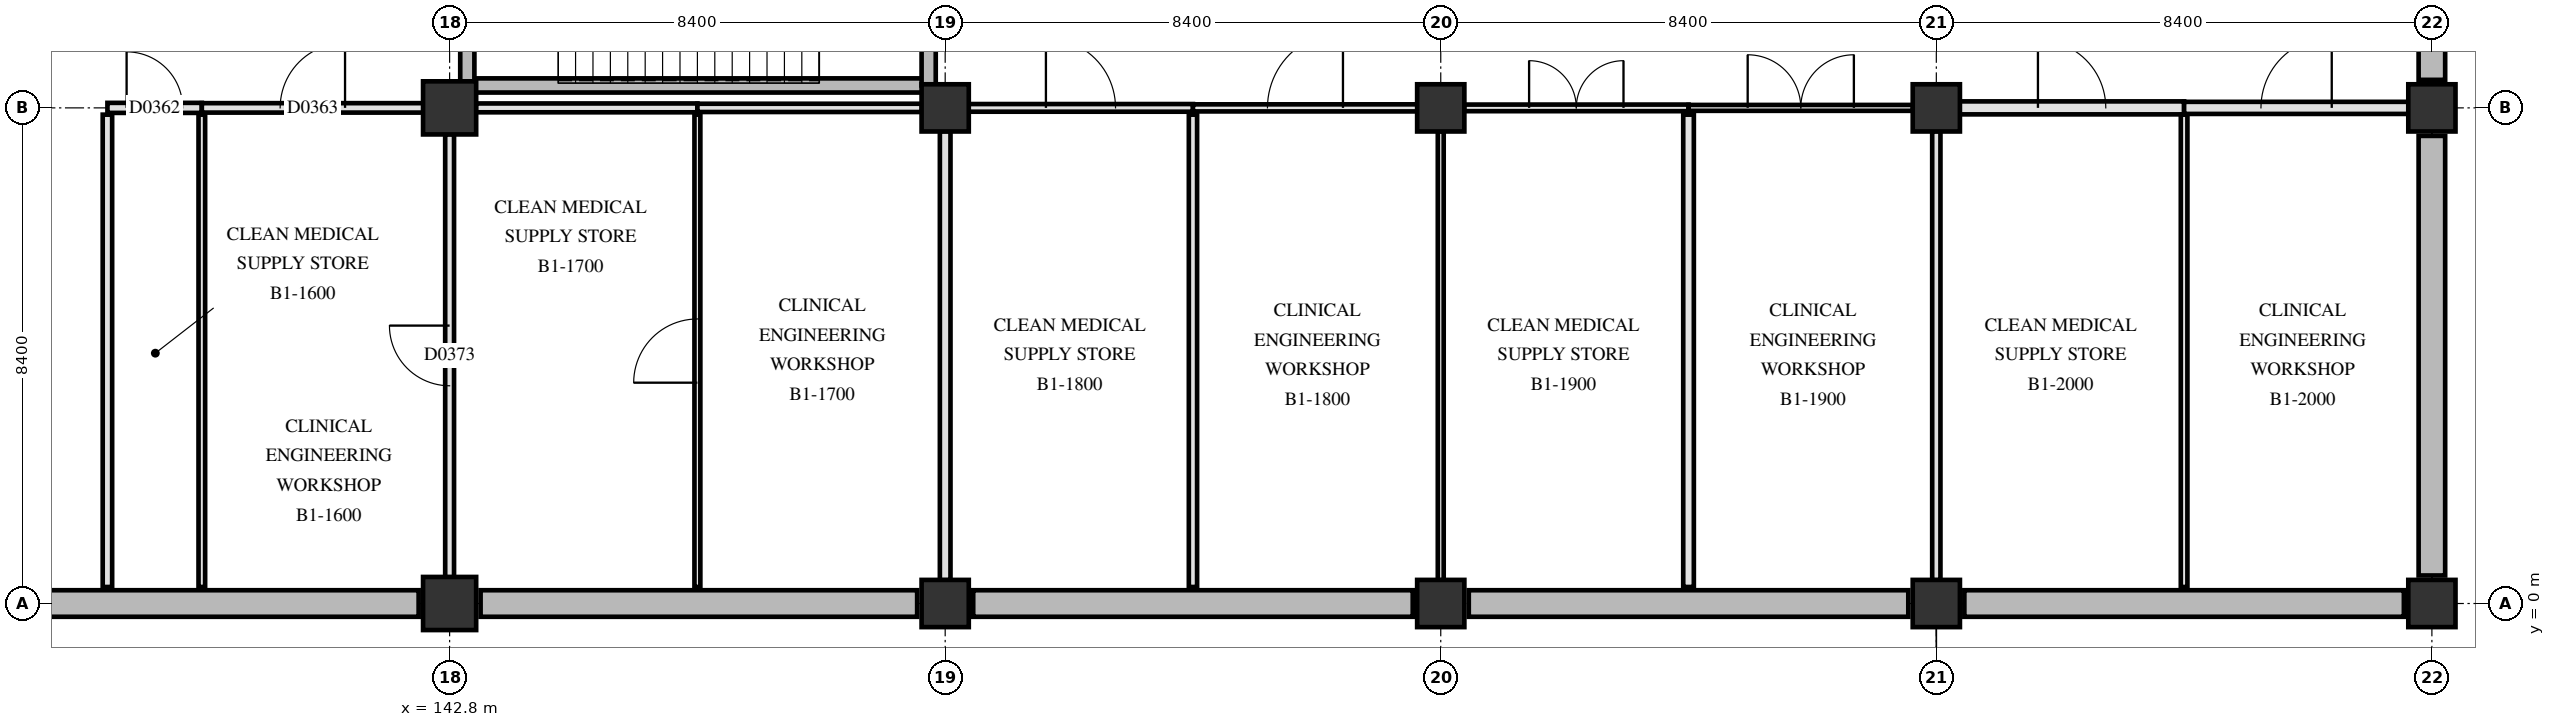
"""IFC4 building model, lengths in metres.
Left out: names, types, materials, properties, quantities, classifications, styles, units other than length and angle.
Written with IfcOpenShell. Run it as: python <this file> out.ifc"""

import sys

from ifc_helpers import new_model, si_unit, direction, frame, frame_2d, origin, origin_2d, place, context, subcontext, project, spatial, rectangle, extrude, element, fill, save


model = new_model("IFC4")
c1 = context("Model", 3, precision=1e-05, world=origin(), true_north=direction((0.0, 1.0)))
c2 = subcontext(c1, "Body", "Model", "MODEL_VIEW")
j1 = project(units=[si_unit("LENGTHUNIT", "METRE"), si_unit("PLANEANGLEUNIT", "RADIAN")], contexts=[c1])
p1 = place(None, origin())
s1 = spatial("IfcSite", under=j1, at=p1, CompositionType="ELEMENT")
p2 = place(p1, origin())
s2 = spatial("IfcBuilding", under=s1, at=p2, CompositionType="ELEMENT")
p3 = place(p2, frame((0.0, 0.0, -5.4)))
s3 = spatial("IfcBuildingStorey", under=s2, at=p3, CompositionType="ELEMENT", Elevation=-5.4)
for number, where, z_axis, x_axis in (
    (1, (142.8, 0.0, 0.0), (0.0, 0.0, 1.0), (1.0, 0.0, 0.0)),
    (2, (142.8, 8.4, 0.0), (0.0, 0.0, 1.0), (1.0, 0.0, 0.0)),
):
    element("IfcColumn", number, at=place(p3, frame(where, z_axis=z_axis, x_axis=x_axis)), inside=s3, PredefinedType="COLUMN", context=c2, shape_type="SweptSolid", body=[
        extrude(rectangle(XDim=0.9, YDim=0.9, at=origin_2d()), origin(), (0.0, 0.0, 1.0), 5.4),
    ])
for number, where, z_axis, x_axis in (
    (3, (151.2, 0.0, 0.0), (0.0, 0.0, 1.0), (1.0, 0.0, 0.0)),
    (4, (151.2, 8.4, 0.0), (0.0, 0.0, 1.0), (1.0, 0.0, 0.0)),
    (5, (159.6, 0.0, 0.0), (0.0, 0.0, 1.0), (1.0, 0.0, 0.0)),
    (6, (159.6, 8.4, 0.0), (0.0, 0.0, 1.0), (1.0, 0.0, 0.0)),
    (7, (168.0, 0.0, 0.0), (0.0, 0.0, 1.0), (1.0, 0.0, 0.0)),
    (8, (168.0, 8.4, 0.0), (0.0, 0.0, 1.0), (1.0, 0.0, 0.0)),
    (9, (176.4, 0.0, 0.0), (0.0, 0.0, 1.0), (1.0, 0.0, 0.0)),
    (10, (176.4, 8.4, 0.0), (0.0, 0.0, 1.0), (1.0, 0.0, 0.0)),
):
    element("IfcColumn", number, at=place(p3, frame(where, z_axis=z_axis, x_axis=x_axis)), inside=s3, PredefinedType="COLUMN", context=c2, shape_type="SweptSolid", body=[
        extrude(rectangle(XDim=0.8, YDim=0.8, at=origin_2d()), origin(), (0.0, 0.0, 1.0), 5.4),
    ])
for number, where, z_axis, x_axis in (
    (11, (176.4, 16.325, 0.0), (0.0, 0.0, 1.0), (0.0, -1.0, 0.0)),
    (12, (176.4, 7.925, 0.0), (0.0, 0.0, 1.0), (0.0, -1.0, 0.0)),
    (13, (175.925, 0.0, 0.0), (0.0, 0.0, 1.0), (-1.0, 0.0, 0.0)),
    (14, (167.525, 0.0, 0.0), (0.0, 0.0, 1.0), (-1.0, 0.0, 0.0)),
    (15, (159.125, 0.0, 0.0), (0.0, 0.0, 1.0), (-1.0, 0.0, 0.0)),
):
    element("IfcWall", number, at=place(p3, frame(where, z_axis=z_axis, x_axis=x_axis)), inside=s3, PredefinedType="SOLIDWALL", context=c2, shape_type="SweptSolid", body=[
        extrude(rectangle(XDim=7.45, YDim=0.45, at=frame_2d((3.725, 0.0))), origin(), (0.0, 0.0, 1.0), 5.08),
    ])
p4 = place(p3, frame((150.725, 0.0, 0.0), z_axis=(0.0, 0.0, 1.0), x_axis=(-1.0, 0.0, 0.0)))
e16 = element("IfcWall", 16, at=p4, inside=s3, PredefinedType="SOLIDWALL", context=c2, shape_type="SweptSolid", body=[
    extrude(rectangle(XDim=7.4, YDim=0.45, at=frame_2d((3.7, 0.0))), origin(), (0.0, 0.0, 1.0), 5.08),
])
p5 = place(p3, frame((142.275, 0.0, 0.0), z_axis=(0.0, 0.0, 1.0), x_axis=(-1.0, 0.0, 0.0)))
e17 = element("IfcWall", 17, at=p5, inside=s3, PredefinedType="SOLIDWALL", context=c2, shape_type="SweptSolid", body=[
    extrude(rectangle(XDim=7.35, YDim=0.45, at=frame_2d((3.675, 0.0))), origin(), (0.0, 0.0, 1.0), 5.08),
])
p6 = place(p3, frame((143.1, 8.78, 0.0), z_axis=(0.0, 0.0, 1.0), x_axis=(1.0, 0.0, 0.0)))
e18 = element("IfcWall", 18, at=p6, inside=s3, PredefinedType="SHEAR", context=c2, shape_type="SweptSolid", body=[
    extrude(rectangle(XDim=7.82, YDim=0.24, at=frame_2d((3.91, 0.0))), origin(), (0.0, 0.0, 1.0), 5.08),
])
for number, where, z_axis, x_axis in (
    (19, (143.1, 8.78, 0.0), (0.0, 0.0, 1.0), (0.0, 1.0, 0.0)),
    (20, (150.92, 8.78, 0.0), (0.0, 0.0, 1.0), (0.0, 1.0, 0.0)),
):
    element("IfcWall", number, at=place(p3, frame(where, z_axis=z_axis, x_axis=x_axis)), inside=s3, PredefinedType="SHEAR", context=c2, shape_type="SweptSolid", body=[
        extrude(rectangle(XDim=3.32, YDim=0.24, at=frame_2d((1.66, 0.0))), origin(), (0.0, 0.0, 1.0), 5.08),
    ])
p7 = place(p3, frame((137.0, 8.4, 0.0), z_axis=(0.0, 0.0, 1.0), x_axis=(1.0, 0.0, 0.0)))
e21 = element("IfcWall", 21, at=p7, inside=s3, PredefinedType="PARTITIONING", context=c2, shape_type="SweptSolid", body=[
    extrude(rectangle(XDim=1.6, YDim=0.17, at=frame_2d((0.8, 0.0))), origin(), (0.0, 0.0, 1.0), 4.42),
])
p8 = place(p7, frame((0.325, 0.0, 0.0)))
e22 = element("IfcOpeningElement", 22, at=p8, cuts=e21, PredefinedType="OPENING", context=c2, shape_type="SweptSolid", body=[
    extrude(rectangle(XDim=0.95, YDim=2.1, at=frame_2d((0.475, 1.05))), frame((0.0, 0.095, 0.0), z_axis=(0.0, -1.0, 0.0), x_axis=(1.0, 0.0, 0.0)), (0.0, 0.0, 1.0), 0.19),
])
p9 = place(p3, frame((138.6, 8.4, 0.0), z_axis=(0.0, 0.0, 1.0), x_axis=(1.0, 0.0, 0.0)))
e23 = element("IfcWall", 23, at=p9, inside=s3, PredefinedType="PARTITIONING", context=c2, shape_type="SweptSolid", body=[
    extrude(rectangle(XDim=3.755, YDim=0.16, at=frame_2d((1.877, 0.0))), origin(), (0.0, 0.0, 1.0), 4.42),
])
p10 = place(p9, frame((1.327, 0.0, 0.0)))
e24 = element("IfcOpeningElement", 24, at=p10, cuts=e23, PredefinedType="OPENING", context=c2, shape_type="SweptSolid", body=[
    extrude(rectangle(XDim=1.1, YDim=2.15, at=frame_2d((0.55, 1.075))), frame((0.0, 0.09, 0.0), z_axis=(0.0, -1.0, 0.0), x_axis=(1.0, 0.0, 0.0)), (0.0, 0.0, 1.0), 0.18),
])
p11 = place(p3, frame((143.245, 8.4, 0.0), z_axis=(0.0, 0.0, 1.0), x_axis=(1.0, 0.0, 0.0)))
e25 = element("IfcWall", 25, at=p11, inside=s3, PredefinedType="PARTITIONING", context=c2, shape_type="SweptSolid", body=[
    extrude(rectangle(XDim=3.755, YDim=0.15, at=frame_2d((1.877, 0.0))), origin(), (0.0, 0.0, 1.0), 4.42),
])
p12 = place(p3, frame((147.0, 8.4, 0.0), z_axis=(0.0, 0.0, 1.0), x_axis=(1.0, 0.0, 0.0)))
e26 = element("IfcWall", 26, at=p12, inside=s3, PredefinedType="PARTITIONING", context=c2, shape_type="SweptSolid", body=[
    extrude(rectangle(XDim=3.805, YDim=0.14, at=frame_2d((1.902, 0.0))), origin(), (0.0, 0.0, 1.0), 4.42),
])
p13 = place(p3, frame((151.595, 8.4, 0.0), z_axis=(0.0, 0.0, 1.0), x_axis=(1.0, 0.0, 0.0)))
e27 = element("IfcWall", 27, at=p13, inside=s3, PredefinedType="PARTITIONING", context=c2, shape_type="SweptSolid", body=[
    extrude(rectangle(XDim=3.805, YDim=0.13, at=frame_2d((1.902, 0.0))), origin(), (0.0, 0.0, 1.0), 4.42),
])
p14 = place(p13, frame((1.312, 0.0, 0.0)))
e28 = element("IfcOpeningElement", 28, at=p14, cuts=e27, PredefinedType="OPENING", context=c2, shape_type="SweptSolid", body=[
    extrude(rectangle(XDim=1.18, YDim=2.18, at=frame_2d((0.59, 1.09))), frame((0.0, 0.075, 0.0), z_axis=(0.0, -1.0, 0.0), x_axis=(1.0, 0.0, 0.0)), (0.0, 0.0, 1.0), 0.15),
])
p15 = place(p3, frame((155.4, 8.4, 0.0), z_axis=(0.0, 0.0, 1.0), x_axis=(1.0, 0.0, 0.0)))
e29 = element("IfcWall", 29, at=p15, inside=s3, PredefinedType="PARTITIONING", context=c2, shape_type="SweptSolid", body=[
    extrude(rectangle(XDim=3.805, YDim=0.12, at=frame_2d((1.903, 0.0))), origin(), (0.0, 0.0, 1.0), 4.42),
])
p16 = place(p15, frame((1.262, 0.0, 0.0)))
e30 = element("IfcOpeningElement", 30, at=p16, cuts=e29, PredefinedType="OPENING", context=c2, shape_type="SweptSolid", body=[
    extrude(rectangle(XDim=1.28, YDim=2.18, at=frame_2d((0.64, 1.09))), frame((0.0, 0.07, 0.0), z_axis=(0.0, -1.0, 0.0), x_axis=(1.0, 0.0, 0.0)), (0.0, 0.0, 1.0), 0.14),
])
p17 = place(p3, frame((159.995, 8.4, 0.0), z_axis=(0.0, 0.0, 1.0), x_axis=(1.0, 0.0, 0.0)))
e31 = element("IfcWall", 31, at=p17, inside=s3, PredefinedType="PARTITIONING", context=c2, shape_type="SweptSolid", body=[
    extrude(rectangle(XDim=3.805, YDim=0.112, at=frame_2d((1.902, 0.0))), origin(), (0.0, 0.0, 1.0), 4.42),
])
p18 = place(p17, frame((1.103, 0.0, 0.0)))
e32 = element("IfcOpeningElement", 32, at=p18, cuts=e31, PredefinedType="OPENING", context=c2, shape_type="SweptSolid", body=[
    extrude(rectangle(XDim=1.6, YDim=2.25, at=frame_2d((0.8, 1.125))), frame((0.0, 0.066, 0.0), z_axis=(0.0, -1.0, 0.0), x_axis=(1.0, 0.0, 0.0)), (0.0, 0.0, 1.0), 0.132),
])
p19 = place(p3, frame((163.8, 8.4, 0.0), z_axis=(0.0, 0.0, 1.0), x_axis=(1.0, 0.0, 0.0)))
e33 = element("IfcWall", 33, at=p19, inside=s3, PredefinedType="PARTITIONING", context=c2, shape_type="SweptSolid", body=[
    extrude(rectangle(XDim=3.805, YDim=0.1, at=frame_2d((1.902, 0.0))), origin(), (0.0, 0.0, 1.0), 4.42),
])
p20 = place(p19, frame((1.002, 0.0, 0.0)))
e34 = element("IfcOpeningElement", 34, at=p20, cuts=e33, PredefinedType="OPENING", context=c2, shape_type="SweptSolid", body=[
    extrude(rectangle(XDim=1.8, YDim=2.25, at=frame_2d((0.9, 1.125))), frame((0.0, 0.06, 0.0), z_axis=(0.0, -1.0, 0.0), x_axis=(1.0, 0.0, 0.0)), (0.0, 0.0, 1.0), 0.12),
])
p21 = place(p3, frame((168.395, 8.4, 0.0), z_axis=(0.0, 0.0, 1.0), x_axis=(1.0, 0.0, 0.0)))
e35 = element("IfcWall", 35, at=p21, inside=s3, PredefinedType="PARTITIONING", context=c2, shape_type="SweptSolid", body=[
    extrude(rectangle(XDim=3.805, YDim=0.22, at=frame_2d((1.902, 0.0))), origin(), (0.0, 0.0, 1.0), 4.42),
])
p22 = place(p21, frame((1.327, 0.0, 0.0)))
e36 = element("IfcOpeningElement", 36, at=p22, cuts=e35, PredefinedType="OPENING", context=c2, shape_type="SweptSolid", body=[
    extrude(rectangle(XDim=1.15, YDim=2.15, at=frame_2d((0.575, 1.075))), frame((0.0, 0.12, 0.0), z_axis=(0.0, -1.0, 0.0), x_axis=(1.0, 0.0, 0.0)), (0.0, 0.0, 1.0), 0.24),
])
p23 = place(p3, frame((172.2, 8.4, 0.0), z_axis=(0.0, 0.0, 1.0), x_axis=(1.0, 0.0, 0.0)))
e37 = element("IfcWall", 37, at=p23, inside=s3, PredefinedType="PARTITIONING", context=c2, shape_type="SweptSolid", body=[
    extrude(rectangle(XDim=3.805, YDim=0.205, at=frame_2d((1.902, 0.0))), origin(), (0.0, 0.0, 1.0), 4.42),
])
p24 = place(p23, frame((1.302, 0.0, 0.0)))
e38 = element("IfcOpeningElement", 38, at=p24, cuts=e37, PredefinedType="OPENING", context=c2, shape_type="SweptSolid", body=[
    extrude(rectangle(XDim=1.2, YDim=2.15, at=frame_2d((0.6, 1.075))), frame((0.0, 0.113, 0.0), z_axis=(0.0, -1.0, 0.0), x_axis=(1.0, 0.0, 0.0)), (0.0, 0.0, 1.0), 0.225),
])
p25 = place(p3, frame((137.0, 0.28, 0.0), z_axis=(0.0, 0.0, 1.0), x_axis=(0.0, 1.0, 0.0)))
e39 = element("IfcWall", 39, at=p25, inside=s3, PredefinedType="PARTITIONING", context=c2, shape_type="SweptSolid", body=[
    extrude(rectangle(XDim=8.005, YDim=0.16, at=frame_2d((4.002, 0.0))), origin(), (0.0, 0.0, 1.0), 4.42),
])
p26 = place(p3, frame((138.6, 0.28, 0.0), z_axis=(0.0, 0.0, 1.0), x_axis=(0.0, 1.0, 0.0)))
e40 = element("IfcWall", 40, at=p26, inside=s3, PredefinedType="PARTITIONING", context=c2, shape_type="SweptSolid", body=[
    extrude(rectangle(XDim=8.005, YDim=0.112, at=frame_2d((4.002, 0.0))), origin(), (0.0, 0.0, 1.0), 4.42),
])
p27 = place(p3, frame((142.8, 0.445, 0.0), z_axis=(0.0, 0.0, 1.0), x_axis=(0.0, 1.0, 0.0)))
e41 = element("IfcWall", 41, at=p27, inside=s3, PredefinedType="PARTITIONING", context=c2, shape_type="SweptSolid", body=[
    extrude(rectangle(XDim=7.51, YDim=0.15, at=frame_2d((3.755, 0.0))), origin(), (0.0, 0.0, 1.0), 4.47),
])
p28 = place(p27, frame((3.245, 0.0, 0.0)))
e42 = element("IfcOpeningElement", 42, at=p28, cuts=e41, PredefinedType="OPENING", context=c2, shape_type="SweptSolid", body=[
    extrude(rectangle(XDim=1.02, YDim=2.12, at=frame_2d((0.51, 1.06))), frame((0.0, 0.085, 0.0), z_axis=(0.0, -1.0, 0.0), x_axis=(1.0, 0.0, 0.0)), (0.0, 0.0, 1.0), 0.17),
])
p29 = place(p3, frame((147.0, 0.28, 0.0), z_axis=(0.0, 0.0, 1.0), x_axis=(0.0, 1.0, 0.0)))
e43 = element("IfcWall", 43, at=p29, inside=s3, PredefinedType="PARTITIONING", context=c2, shape_type="SweptSolid", body=[
    extrude(rectangle(XDim=8.005, YDim=0.1, at=frame_2d((4.002, 0.0))), origin(), (0.0, 0.0, 1.0), 4.42),
])
p30 = place(p29, frame((3.462, 0.0, 0.0)))
e44 = element("IfcOpeningElement", 44, at=p30, cuts=e43, PredefinedType="OPENING", context=c2, shape_type="SweptSolid", body=[
    extrude(rectangle(XDim=1.08, YDim=2.12, at=frame_2d((0.54, 1.06))), frame((0.0, 0.06, 0.0), z_axis=(0.0, -1.0, 0.0), x_axis=(1.0, 0.0, 0.0)), (0.0, 0.0, 1.0), 0.12),
])
p31 = place(p3, frame((151.2, 0.395, 0.0), z_axis=(0.0, 0.0, 1.0), x_axis=(0.0, 1.0, 0.0)))
e45 = element("IfcWall", 45, at=p31, inside=s3, PredefinedType="PARTITIONING", context=c2, shape_type="SweptSolid", body=[
    extrude(rectangle(XDim=7.61, YDim=0.18, at=frame_2d((3.805, 0.0))), origin(), (0.0, 0.0, 1.0), 4.47),
])
p32 = place(p3, frame((155.4, 0.28, 0.0), z_axis=(0.0, 0.0, 1.0), x_axis=(0.0, 1.0, 0.0)))
e46 = element("IfcWall", 46, at=p32, inside=s3, PredefinedType="PARTITIONING", context=c2, shape_type="SweptSolid", body=[
    extrude(rectangle(XDim=8.005, YDim=0.14, at=frame_2d((4.002, 0.0))), origin(), (0.0, 0.0, 1.0), 4.42),
])
p33 = place(p3, frame((159.6, 0.395, 0.0), z_axis=(0.0, 0.0, 1.0), x_axis=(0.0, 1.0, 0.0)))
e47 = element("IfcWall", 47, at=p33, inside=s3, PredefinedType="PARTITIONING", context=c2, shape_type="SweptSolid", body=[
    extrude(rectangle(XDim=7.61, YDim=0.1, at=frame_2d((3.805, 0.0))), origin(), (0.0, 0.0, 1.0), 4.47),
])
p34 = place(p3, frame((163.8, 0.28, 0.0), z_axis=(0.0, 0.0, 1.0), x_axis=(0.0, 1.0, 0.0)))
e48 = element("IfcWall", 48, at=p34, inside=s3, PredefinedType="PARTITIONING", context=c2, shape_type="SweptSolid", body=[
    extrude(rectangle(XDim=8.005, YDim=0.18, at=frame_2d((4.002, 0.0))), origin(), (0.0, 0.0, 1.0), 4.42),
])
p35 = place(p3, frame((168.0, 0.395, 0.0), z_axis=(0.0, 0.0, 1.0), x_axis=(0.0, 1.0, 0.0)))
e49 = element("IfcWall", 49, at=p35, inside=s3, PredefinedType="PARTITIONING", context=c2, shape_type="SweptSolid", body=[
    extrude(rectangle(XDim=7.61, YDim=0.14, at=frame_2d((3.805, 0.0))), origin(), (0.0, 0.0, 1.0), 4.47),
])
p36 = place(p3, frame((172.2, 0.28, 0.0), z_axis=(0.0, 0.0, 1.0), x_axis=(0.0, 1.0, 0.0)))
e50 = element("IfcWall", 50, at=p36, inside=s3, PredefinedType="PARTITIONING", context=c2, shape_type="SweptSolid", body=[
    extrude(rectangle(XDim=8.005, YDim=0.112, at=frame_2d((4.002, 0.0))), origin(), (0.0, 0.0, 1.0), 4.42),
])
p37 = place(p8, origin())
e51 = element("IfcDoor", 51, at=p37, inside=s3, OperationType="SINGLE_SWING_LEFT", PredefinedType="DOOR", context=c2, shape_type="SweptSolid", body=[
    extrude(rectangle(XDim=0.95, YDim=2.1, at=frame_2d((0.475, 1.05))), frame((0.0, 0.025, 0.0), z_axis=(0.0, -1.0, 0.0), x_axis=(1.0, 0.0, 0.0)), (0.0, 0.0, 1.0), 0.05),
])
fill(e22, e51)
p38 = place(p10, origin())
e52 = element("IfcDoor", 52, at=p38, inside=s3, OperationType="SINGLE_SWING_RIGHT", PredefinedType="DOOR", context=c2, shape_type="SweptSolid", body=[
    extrude(rectangle(XDim=1.1, YDim=2.15, at=frame_2d((0.55, 1.075))), frame((0.0, 0.025, 0.0), z_axis=(0.0, -1.0, 0.0), x_axis=(1.0, 0.0, 0.0)), (0.0, 0.0, 1.0), 0.05),
])
fill(e24, e52)
p39 = place(p28, origin())
e53 = element("IfcDoor", 53, at=p39, inside=s3, OperationType="SINGLE_SWING_RIGHT", PredefinedType="DOOR", context=c2, shape_type="SweptSolid", body=[
    extrude(rectangle(XDim=1.02, YDim=2.12, at=frame_2d((0.51, 1.06))), frame((0.0, 0.025, 0.0), z_axis=(0.0, -1.0, 0.0), x_axis=(1.0, 0.0, 0.0)), (0.0, 0.0, 1.0), 0.05),
])
fill(e42, e53)
p40 = place(p30, origin())
e54 = element("IfcDoor", 54, at=p40, inside=s3, OperationType="SINGLE_SWING_LEFT", PredefinedType="DOOR", context=c2, shape_type="SweptSolid", body=[
    extrude(rectangle(XDim=1.08, YDim=2.12, at=frame_2d((0.54, 1.06))), frame((0.0, 0.025, 0.0), z_axis=(0.0, -1.0, 0.0), x_axis=(1.0, 0.0, 0.0)), (0.0, 0.0, 1.0), 0.05),
])
fill(e44, e54)
p41 = place(p14, origin())
e55 = element("IfcDoor", 55, at=p41, inside=s3, OperationType="SINGLE_SWING_LEFT", PredefinedType="DOOR", context=c2, shape_type="SweptSolid", body=[
    extrude(rectangle(XDim=1.18, YDim=2.18, at=frame_2d((0.59, 1.09))), frame((0.0, 0.025, 0.0), z_axis=(0.0, -1.0, 0.0), x_axis=(1.0, 0.0, 0.0)), (0.0, 0.0, 1.0), 0.05),
])
fill(e28, e55)
p42 = place(p16, origin())
e56 = element("IfcDoor", 56, at=p42, inside=s3, OperationType="SINGLE_SWING_RIGHT", PredefinedType="DOOR", context=c2, shape_type="SweptSolid", body=[
    extrude(rectangle(XDim=1.28, YDim=2.18, at=frame_2d((0.64, 1.09))), frame((0.0, 0.025, 0.0), z_axis=(0.0, -1.0, 0.0), x_axis=(1.0, 0.0, 0.0)), (0.0, 0.0, 1.0), 0.05),
])
fill(e30, e56)
p43 = place(p18, origin())
e57 = element("IfcDoor", 57, at=p43, inside=s3, OperationType="DOUBLE_SWING_LEFT", PredefinedType="DOOR", context=c2, shape_type="SweptSolid", body=[
    extrude(rectangle(XDim=1.6, YDim=2.25, at=frame_2d((0.8, 1.125))), frame((0.0, 0.025, 0.0), z_axis=(0.0, -1.0, 0.0), x_axis=(1.0, 0.0, 0.0)), (0.0, 0.0, 1.0), 0.05),
])
fill(e32, e57)
p44 = place(p20, origin())
e58 = element("IfcDoor", 58, at=p44, inside=s3, OperationType="DOUBLE_SWING_RIGHT", PredefinedType="DOOR", context=c2, shape_type="SweptSolid", body=[
    extrude(rectangle(XDim=1.8, YDim=2.25, at=frame_2d((0.9, 1.125))), frame((0.0, 0.025, 0.0), z_axis=(0.0, -1.0, 0.0), x_axis=(1.0, 0.0, 0.0)), (0.0, 0.0, 1.0), 0.05),
])
fill(e34, e58)
p45 = place(p22, origin())
e59 = element("IfcDoor", 59, at=p45, inside=s3, OperationType="SINGLE_SWING_LEFT", PredefinedType="DOOR", context=c2, shape_type="SweptSolid", body=[
    extrude(rectangle(XDim=1.15, YDim=2.15, at=frame_2d((0.575, 1.075))), frame((0.0, 0.025, 0.0), z_axis=(0.0, -1.0, 0.0), x_axis=(1.0, 0.0, 0.0)), (0.0, 0.0, 1.0), 0.05),
])
fill(e36, e59)
p46 = place(p24, origin())
e60 = element("IfcDoor", 60, at=p46, inside=s3, OperationType="SINGLE_SWING_RIGHT", PredefinedType="DOOR", context=c2, shape_type="SweptSolid", body=[
    extrude(rectangle(XDim=1.2, YDim=2.15, at=frame_2d((0.6, 1.075))), frame((0.0, 0.025, 0.0), z_axis=(0.0, -1.0, 0.0), x_axis=(1.0, 0.0, 0.0)), (0.0, 0.0, 1.0), 0.05),
])
fill(e38, e60)
save(model, sys.argv[1])
